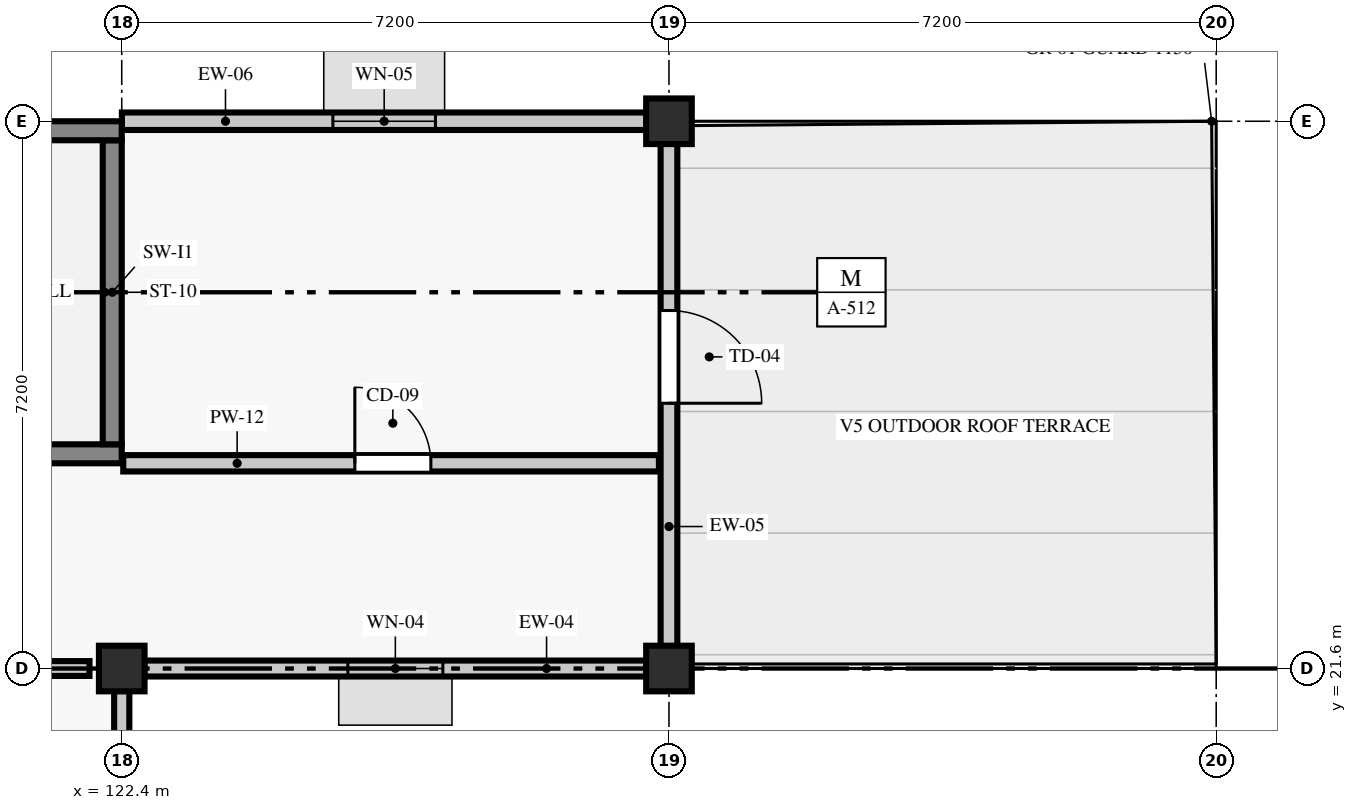
"""IFC4 building model, lengths in metres.
Left out: names, types, materials, properties, quantities, classifications, styles, units other than length and angle.
Written with IfcOpenShell. Run it as: python <this file> out.ifc"""

import sys

from ifc_helpers import new_model, si_unit, direction, frame, frame_2d, origin, origin_2d, place, context, subcontext, project, spatial, rectangle, extrude, element, fill, save


model = new_model("IFC4")
c1 = context("Model", 3, precision=1e-05, world=origin(), true_north=direction((0.0, 1.0)))
c2 = subcontext(c1, "Body", "Model", "MODEL_VIEW")
j1 = project(units=[si_unit("LENGTHUNIT", "METRE"), si_unit("PLANEANGLEUNIT", "RADIAN")], contexts=[c1])
p1 = place(None, origin())
s1 = spatial("IfcSite", under=j1, at=p1, CompositionType="ELEMENT")
p2 = place(p1, origin())
s2 = spatial("IfcBuilding", under=s1, at=p2, CompositionType="ELEMENT")
p3 = place(p2, frame((0.0, 0.0, 9.6)))
s3 = spatial("IfcBuildingStorey", under=s2, at=p3, CompositionType="ELEMENT", Elevation=9.6)
p4 = place(p3, frame((122.4, 21.6, 0.0), z_axis=(0.0, 0.0, 1.0), x_axis=(1.0, 0.0, 0.0)))
e1 = element("IfcColumn", 1, at=p4, inside=s3, PredefinedType="COLUMN", context=c2, shape_type="SweptSolid", body=[
    extrude(rectangle(XDim=0.6, YDim=0.6, at=origin_2d()), origin(), (0.0, 0.0, 1.0), 3.885),
])
for number, where, z_axis, x_axis in (
    (2, (129.6, 21.6, 0.0), (0.0, 0.0, 1.0), (1.0, 0.0, 0.0)),
    (3, (129.6, 28.8, 0.0), (0.0, 0.0, 1.0), (1.0, 0.0, 0.0)),
):
    element("IfcColumn", number, at=place(p3, frame(where, z_axis=z_axis, x_axis=x_axis)), inside=s3, PredefinedType="COLUMN", context=c2, shape_type="SweptSolid", body=[
        extrude(rectangle(XDim=0.6, YDim=0.6, at=origin_2d()), origin(), (0.0, 0.0, 1.0), 3.932),
    ])
p5 = place(p3, frame((122.4, 14.696, 0.0), z_axis=(0.0, 0.0, 1.0), x_axis=(0.0, 1.0, 0.0)))
e4 = element("IfcWall", 4, at=p5, inside=s3, PredefinedType="STANDARD", context=c2, shape_type="SweptSolid", body=[
    extrude(rectangle(XDim=6.608, YDim=0.2, at=frame_2d((3.304, 0.0))), origin(), (0.0, 0.0, 1.0), 3.235),
])
p6 = place(p5, frame((2.729, 0.0, 0.9)))
e5 = element("IfcOpeningElement", 5, at=p6, cuts=e4, PredefinedType="OPENING", context=c2, shape_type="SweptSolid", body=[
    extrude(rectangle(XDim=1.15, YDim=1.3, at=frame_2d((0.575, 0.65))), frame((0.0, 0.11, 0.0), z_axis=(0.0, -1.0, 0.0), x_axis=(1.0, 0.0, 0.0)), (0.0, 0.0, 1.0), 0.22),
])
p7 = place(p3, frame((122.696, 21.6, 0.0), z_axis=(0.0, 0.0, 1.0), x_axis=(1.0, 0.0, 0.0)))
e6 = element("IfcWall", 6, at=p7, inside=s3, PredefinedType="STANDARD", context=c2, shape_type="SweptSolid", body=[
    extrude(rectangle(XDim=6.608, YDim=0.21, at=frame_2d((3.304, 0.0))), origin(), (0.0, 0.0, 1.0), 3.282),
])
p8 = place(p7, frame((2.679, 0.0, 0.9)))
e7 = element("IfcOpeningElement", 7, at=p8, cuts=e6, PredefinedType="OPENING", context=c2, shape_type="SweptSolid", body=[
    extrude(rectangle(XDim=1.25, YDim=1.3, at=frame_2d((0.625, 0.65))), frame((0.0, 0.115, 0.0), z_axis=(0.0, -1.0, 0.0), x_axis=(1.0, 0.0, 0.0)), (0.0, 0.0, 1.0), 0.23),
])
p9 = place(p3, frame((129.6, 21.896, 0.0), z_axis=(0.0, 0.0, 1.0), x_axis=(0.0, 1.0, 0.0)))
e8 = element("IfcWall", 8, at=p9, inside=s3, PredefinedType="STANDARD", context=c2, shape_type="SweptSolid", body=[
    extrude(rectangle(XDim=6.608, YDim=0.22, at=frame_2d((3.304, 0.0))), origin(), (0.0, 0.0, 1.0), 3.282),
])
p10 = place(p9, frame((3.194, 0.0, 0.0)))
e9 = element("IfcOpeningElement", 9, at=p10, cuts=e8, PredefinedType="OPENING", context=c2, shape_type="SweptSolid", body=[
    extrude(rectangle(XDim=1.22, YDim=2.15, at=frame_2d((0.61, 1.075))), frame((0.0, 0.12, 0.0), z_axis=(0.0, -1.0, 0.0), x_axis=(1.0, 0.0, 0.0)), (0.0, 0.0, 1.0), 0.24),
])
p11 = place(p3, frame((129.304, 28.8, 0.0), z_axis=(0.0, 0.0, 1.0), x_axis=(-1.0, 0.0, 0.0)))
e10 = element("IfcWall", 10, at=p11, inside=s3, PredefinedType="STANDARD", context=c2, shape_type="SweptSolid", body=[
    extrude(rectangle(XDim=6.902, YDim=0.23, at=frame_2d((3.451, 0.0))), origin(), (0.0, 0.0, 1.0), 3.885),
])
p12 = place(p11, frame((2.776, 0.0, 0.9)))
e11 = element("IfcOpeningElement", 11, at=p12, cuts=e10, PredefinedType="OPENING", context=c2, shape_type="SweptSolid", body=[
    extrude(rectangle(XDim=1.35, YDim=1.3, at=frame_2d((0.675, 0.65))), frame((0.0, 0.125, 0.0), z_axis=(0.0, -1.0, 0.0), x_axis=(1.0, 0.0, 0.0)), (0.0, 0.0, 1.0), 0.25),
])
p13 = place(p3, frame((113.6, 24.425, 0.0), z_axis=(0.0, 0.0, 1.0), x_axis=(1.0, 0.0, 0.0)))
e12 = element("IfcWall", 12, at=p13, inside=s3, PredefinedType="SHEAR", context=c2, shape_type="SweptSolid", body=[
    extrude(rectangle(XDim=8.8, YDim=0.25, at=frame_2d((4.4, 0.0))), origin(), (0.0, 0.0, 1.0), 3.885),
])
p14 = place(p13, frame((0.3, 0.0, 0.0)))
e13 = element("IfcOpeningElement", 13, at=p14, cuts=e12, PredefinedType="OPENING", context=c2, shape_type="SweptSolid", body=[
    extrude(rectangle(XDim=1.5, YDim=2.15, at=frame_2d((0.75, 1.075))), frame((0.0, 0.135, 0.0), z_axis=(0.0, -1.0, 0.0), x_axis=(1.0, 0.0, 0.0)), (0.0, 0.0, 1.0), 0.27),
])
p15 = place(p3, frame((122.275, 24.55, 0.0), z_axis=(0.0, 0.0, 1.0), x_axis=(0.0, 1.0, 0.0)))
e14 = element("IfcWall", 14, at=p15, inside=s3, PredefinedType="SHEAR", context=c2, shape_type="SweptSolid", body=[
    extrude(rectangle(XDim=4.0, YDim=0.25, at=frame_2d((2.0, 0.0))), origin(), (0.0, 0.0, 1.0), 3.885),
])
p16 = place(p3, frame((122.4, 28.675, 0.0), z_axis=(0.0, 0.0, 1.0), x_axis=(-1.0, 0.0, 0.0)))
e15 = element("IfcWall", 15, at=p16, inside=s3, PredefinedType="SHEAR", context=c2, shape_type="SweptSolid", body=[
    extrude(rectangle(XDim=8.8, YDim=0.25, at=frame_2d((4.4, 0.0))), origin(), (0.0, 0.0, 1.0), 3.885),
])
p17 = place(p16, frame((7.27, 0.0, 0.92)))
e16 = element("IfcOpeningElement", 16, at=p17, cuts=e15, PredefinedType="OPENING", context=c2, shape_type="SweptSolid", body=[
    extrude(rectangle(XDim=1.18, YDim=1.48, at=frame_2d((0.59, 0.74))), frame((0.0, 0.135, 0.0), z_axis=(0.0, -1.0, 0.0), x_axis=(1.0, 0.0, 0.0)), (0.0, 0.0, 1.0), 0.27),
])
p18 = place(p3, frame((94.024, 21.6, 0.0), z_axis=(0.0, 0.0, 1.0), x_axis=(1.0, 0.0, 0.0)))
e17 = element("IfcWall", 17, at=p18, inside=s3, PredefinedType="PARTITIONING", context=c2, shape_type="SweptSolid", body=[
    extrude(rectangle(XDim=27.951, YDim=0.195, at=frame_2d((13.976, 0.0))), origin(), (0.0, 0.0, 1.0), 3.185),
])
p19 = place(p18, frame((2.632, 0.0, 0.0)))
e18 = element("IfcOpeningElement", 18, at=p19, cuts=e17, PredefinedType="OPENING", context=c2, shape_type="SweptSolid", body=[
    extrude(rectangle(XDim=0.9, YDim=2.08, at=frame_2d((0.45, 1.04))), frame((0.0, 0.107, 0.0), z_axis=(0.0, -1.0, 0.0), x_axis=(1.0, 0.0, 0.0)), (0.0, 0.0, 1.0), 0.215),
])
p20 = place(p18, frame((7.65, 0.0, 0.0)))
e19 = element("IfcOpeningElement", 19, at=p20, cuts=e17, PredefinedType="OPENING", context=c2, shape_type="SweptSolid", body=[
    extrude(rectangle(XDim=0.94, YDim=2.08, at=frame_2d((0.47, 1.04))), frame((0.0, 0.107, 0.0), z_axis=(0.0, -1.0, 0.0), x_axis=(1.0, 0.0, 0.0)), (0.0, 0.0, 1.0), 0.215),
])
p21 = place(p18, frame((9.727, 0.0, 0.0)))
e20 = element("IfcOpeningElement", 20, at=p21, cuts=e17, PredefinedType="OPENING", context=c2, shape_type="SweptSolid", body=[
    extrude(rectangle(XDim=0.98, YDim=2.08, at=frame_2d((0.49, 1.04))), frame((0.0, 0.107, 0.0), z_axis=(0.0, -1.0, 0.0), x_axis=(1.0, 0.0, 0.0)), (0.0, 0.0, 1.0), 0.215),
])
p22 = place(p18, frame((14.946, 0.0, 0.0)))
e21 = element("IfcOpeningElement", 21, at=p22, cuts=e17, PredefinedType="OPENING", context=c2, shape_type="SweptSolid", body=[
    extrude(rectangle(XDim=0.94, YDim=2.08, at=frame_2d((0.47, 1.04))), frame((0.0, 0.107, 0.0), z_axis=(0.0, -1.0, 0.0), x_axis=(1.0, 0.0, 0.0)), (0.0, 0.0, 1.0), 0.215),
])
p23 = place(p18, frame((17.136, 0.0, 0.0)))
e22 = element("IfcOpeningElement", 22, at=p23, cuts=e17, PredefinedType="OPENING", context=c2, shape_type="SweptSolid", body=[
    extrude(rectangle(XDim=0.9, YDim=2.08, at=frame_2d((0.45, 1.04))), frame((0.0, 0.107, 0.0), z_axis=(0.0, -1.0, 0.0), x_axis=(1.0, 0.0, 0.0)), (0.0, 0.0, 1.0), 0.215),
])
p24 = place(p18, frame((19.366, 0.0, 0.0)))
e23 = element("IfcOpeningElement", 23, at=p24, cuts=e17, PredefinedType="OPENING", context=c2, shape_type="SweptSolid", body=[
    extrude(rectangle(XDim=0.9, YDim=2.13, at=frame_2d((0.45, 1.065))), frame((0.0, 0.107, 0.0), z_axis=(0.0, -1.0, 0.0), x_axis=(1.0, 0.0, 0.0)), (0.0, 0.0, 1.0), 0.215),
])
p25 = place(p18, frame((24.284, 0.0, 0.0)))
e24 = element("IfcOpeningElement", 24, at=p25, cuts=e17, PredefinedType="OPENING", context=c2, shape_type="SweptSolid", body=[
    extrude(rectangle(XDim=0.9, YDim=2.13, at=frame_2d((0.45, 1.065))), frame((0.0, 0.107, 0.0), z_axis=(0.0, -1.0, 0.0), x_axis=(1.0, 0.0, 0.0)), (0.0, 0.0, 1.0), 0.215),
])
p26 = place(p3, frame((122.42, 24.3, 0.0), z_axis=(0.0, 0.0, 1.0), x_axis=(1.0, 0.0, 0.0)))
e25 = element("IfcWall", 25, at=p26, inside=s3, PredefinedType="PARTITIONING", context=c2, shape_type="SweptSolid", body=[
    extrude(rectangle(XDim=7.048, YDim=0.215, at=frame_2d((3.524, 0.0))), origin(), (0.0, 0.0, 1.0), 3.885),
])
p27 = place(p26, frame((3.047, 0.0, 0.0)))
e26 = element("IfcOpeningElement", 26, at=p27, cuts=e25, PredefinedType="OPENING", context=c2, shape_type="SweptSolid", body=[
    extrude(rectangle(XDim=1.0, YDim=2.13, at=frame_2d((0.5, 1.065))), frame((0.0, 0.117, 0.0), z_axis=(0.0, -1.0, 0.0), x_axis=(1.0, 0.0, 0.0)), (0.0, 0.0, 1.0), 0.235),
])
p28 = place(p8, origin())
e27 = element("IfcWindow", 27, at=p28, inside=s3, PartitioningType="SINGLE_PANEL", PredefinedType="WINDOW", context=c2, shape_type="SweptSolid", body=[
    extrude(rectangle(XDim=1.25, YDim=1.3, at=frame_2d((0.625, 0.65))), frame((0.0, 0.03, 0.0), z_axis=(0.0, -1.0, 0.0), x_axis=(1.0, 0.0, 0.0)), (0.0, 0.0, 1.0), 0.06),
])
fill(e7, e27)
p29 = place(p10, frame((1.22, 0.0, 0.0), z_axis=(0.0, 0.0, 1.0), x_axis=(-1.0, 0.0, 0.0)))
e28 = element("IfcDoor", 28, at=p29, inside=s3, OperationType="SINGLE_SWING_RIGHT", PredefinedType="DOOR", context=c2, shape_type="SweptSolid", body=[
    extrude(rectangle(XDim=1.22, YDim=2.15, at=frame_2d((0.61, 1.075))), frame((0.0, 0.025, 0.0), z_axis=(0.0, -1.0, 0.0), x_axis=(1.0, 0.0, 0.0)), (0.0, 0.0, 1.0), 0.05),
])
fill(e9, e28)
p30 = place(p12, origin())
e29 = element("IfcWindow", 29, at=p30, inside=s3, PartitioningType="SINGLE_PANEL", PredefinedType="WINDOW", context=c2, shape_type="SweptSolid", body=[
    extrude(rectangle(XDim=1.35, YDim=1.3, at=frame_2d((0.675, 0.65))), frame((0.0, 0.03, 0.0), z_axis=(0.0, -1.0, 0.0), x_axis=(1.0, 0.0, 0.0)), (0.0, 0.0, 1.0), 0.06),
])
fill(e11, e29)
p31 = place(p27, origin())
e30 = element("IfcDoor", 30, at=p31, inside=s3, OperationType="SINGLE_SWING_LEFT", PredefinedType="DOOR", context=c2, shape_type="SweptSolid", body=[
    extrude(rectangle(XDim=1.0, YDim=2.13, at=frame_2d((0.5, 1.065))), frame((0.0, 0.025, 0.0), z_axis=(0.0, -1.0, 0.0), x_axis=(1.0, 0.0, 0.0)), (0.0, 0.0, 1.0), 0.05),
])
fill(e26, e30)
save(model, sys.argv[1])
